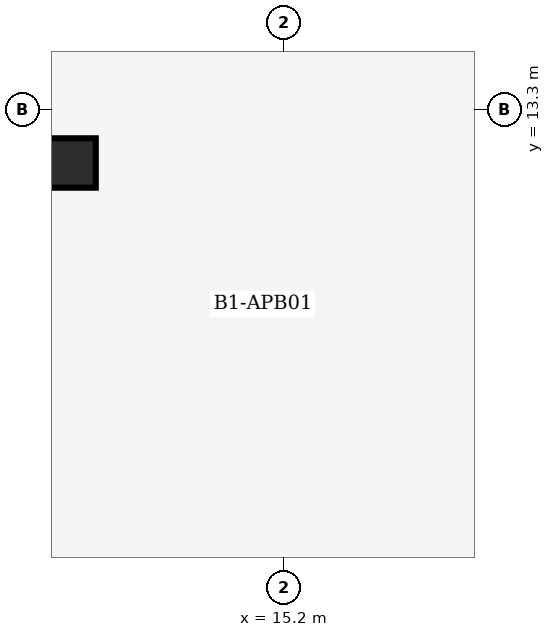
"""IFC4 building model, lengths in metres.
Left out: names, types, materials, properties, quantities, classifications, styles, units other than length and angle.
Written with IfcOpenShell. Run it as: python <this file> out.ifc"""

import sys

from ifc_helpers import new_model, si_unit, direction, frame, origin, origin_2d, place, context, subcontext, project, spatial, rectangle, extrude, element, save


model = new_model("IFC4")
c1 = context("Model", 3, precision=1e-05, world=origin(), true_north=direction((0.0, 1.0)))
c2 = subcontext(c1, "Body", "Model", "MODEL_VIEW")
j1 = project(units=[si_unit("LENGTHUNIT", "METRE"), si_unit("PLANEANGLEUNIT", "RADIAN")], contexts=[c1])
p1 = place(None, origin())
s1 = spatial("IfcSite", under=j1, at=p1, CompositionType="ELEMENT")
p2 = place(p1, origin())
s2 = spatial("IfcBuilding", under=s1, at=p2, CompositionType="ELEMENT")
p3 = place(p2, frame((0.0, 0.0, -4.8)))
s3 = spatial("IfcBuildingStorey", under=s2, at=p3, CompositionType="ELEMENT", Elevation=-4.8)
p4 = place(p3, frame((12.4, 12.6, 0.0), z_axis=(0.0, 0.0, 1.0), x_axis=(1.0, 0.0, 0.0)))
e1 = element("IfcColumn", 1, at=p4, inside=s3, PredefinedType="COLUMN", context=c2, shape_type="SweptSolid", body=[
    extrude(rectangle(XDim=0.65, YDim=0.65, at=origin_2d()), origin(), (0.0, 0.0, 1.0), 4.8),
])
save(model, sys.argv[1])
